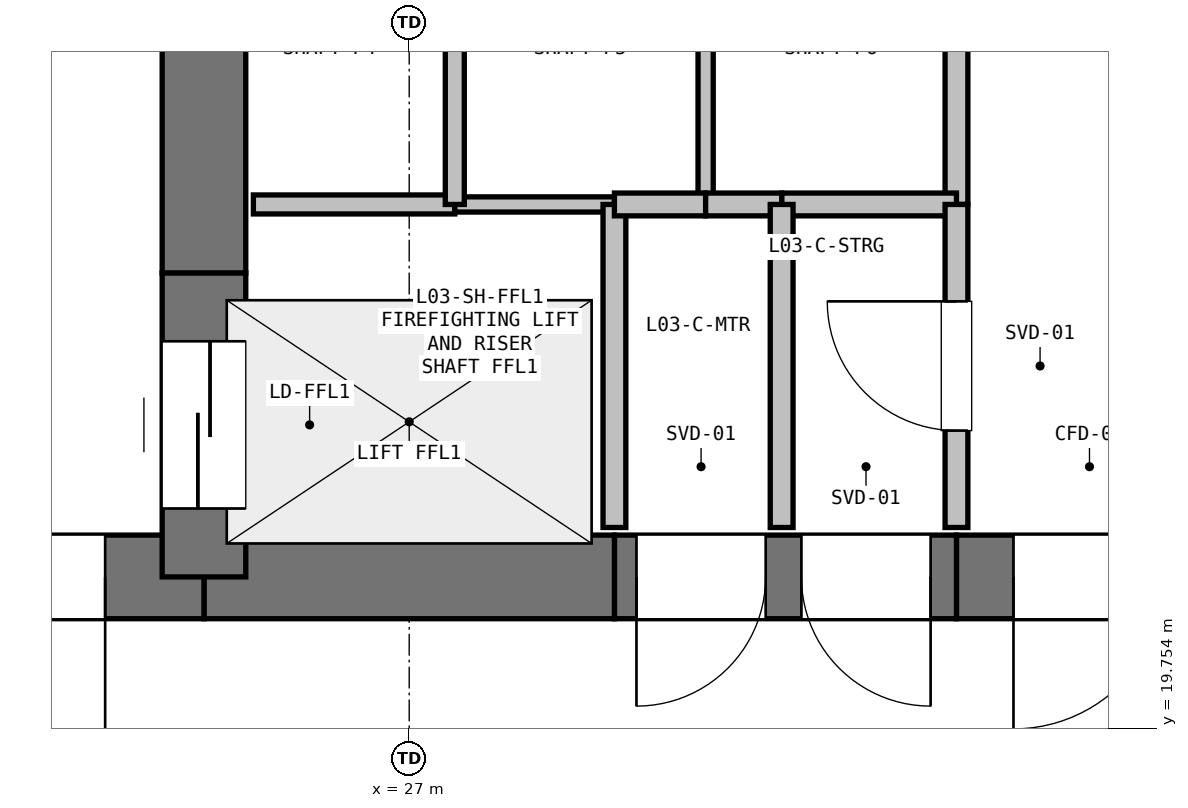
"""IFC4 building model, lengths in metres.
Left out: names, types, materials, properties, quantities, classifications, styles, units other than length and angle.
Written with IfcOpenShell. Run it as: python <this file> out.ifc"""

import sys

from ifc_helpers import new_model, si_unit, direction, frame, frame_2d, origin, place, context, subcontext, project, spatial, rectangle, extrude, element, fill, save


model = new_model("IFC4")
c1 = context("Model", 3, precision=1e-05, world=origin(), true_north=direction((0.0, 1.0)))
c2 = subcontext(c1, "Body", "Model", "MODEL_VIEW")
j1 = project(units=[si_unit("LENGTHUNIT", "METRE"), si_unit("PLANEANGLEUNIT", "RADIAN")], contexts=[c1])
p1 = place(None, origin())
s1 = spatial("IfcSite", under=j1, at=p1, CompositionType="ELEMENT")
p2 = place(p1, origin())
s2 = spatial("IfcBuilding", under=s1, at=p2, CompositionType="ELEMENT")
p3 = place(p2, frame((0.0, 0.0, 14.4)))
s3 = spatial("IfcBuildingStorey", under=s2, at=p3, CompositionType="ELEMENT", Elevation=14.4)
p4 = place(p3, frame((32.35, 20.75, 0.0), z_axis=(0.0, 0.0, 1.0), x_axis=(-1.0, 0.0, 0.0)))
e1 = element("IfcWall", 1, at=p4, inside=s3, PredefinedType="SHEAR", context=c2, shape_type="SweptSolid", body=[
    extrude(rectangle(XDim=1.75, YDim=0.55, at=frame_2d((0.875, 0.0))), origin(), (0.0, 0.0, 1.0), 4.52),
])
p5 = place(p4, frame((0.375, 0.0, 0.0)))
e2 = element("IfcOpeningElement", 2, at=p5, cuts=e1, PredefinedType="OPENING", context=c2, shape_type="SweptSolid", body=[
    extrude(rectangle(XDim=1.0, YDim=2.15, at=frame_2d((0.5, 1.075))), frame((0.0, 0.285, 0.0), z_axis=(0.0, -1.0, 0.0), x_axis=(1.0, 0.0, 0.0)), (0.0, 0.0, 1.0), 0.57),
])
p6 = place(p3, frame((30.6, 20.75, 0.0), z_axis=(0.0, 0.0, 1.0), x_axis=(-1.0, 0.0, 0.0)))
e3 = element("IfcWall", 3, at=p6, inside=s3, PredefinedType="SHEAR", context=c2, shape_type="SweptSolid", body=[
    extrude(rectangle(XDim=2.25, YDim=0.55, at=frame_2d((1.125, 0.0))), origin(), (0.0, 0.0, 1.0), 4.52),
])
p7 = place(p6, frame((1.255, 0.0, 0.0)))
e4 = element("IfcOpeningElement", 4, at=p7, cuts=e3, PredefinedType="OPENING", context=c2, shape_type="SweptSolid", body=[
    extrude(rectangle(XDim=0.85, YDim=2.1, at=frame_2d((0.425, 1.05))), frame((0.0, 0.285, 0.0), z_axis=(0.0, -1.0, 0.0), x_axis=(1.0, 0.0, 0.0)), (0.0, 0.0, 1.0), 0.57),
])
p8 = place(p6, frame((0.17, 0.0, 0.0)))
e5 = element("IfcOpeningElement", 5, at=p8, cuts=e3, PredefinedType="OPENING", context=c2, shape_type="SweptSolid", body=[
    extrude(rectangle(XDim=0.85, YDim=2.1, at=frame_2d((0.425, 1.05))), frame((0.0, 0.285, 0.0), z_axis=(0.0, -1.0, 0.0), x_axis=(1.0, 0.0, 0.0)), (0.0, 0.0, 1.0), 0.57),
])
p9 = place(p3, frame((28.35, 20.75, 0.0), z_axis=(0.0, 0.0, 1.0), x_axis=(-1.0, 0.0, 0.0)))
e6 = element("IfcWall", 6, at=p9, inside=s3, PredefinedType="SHEAR", context=c2, shape_type="SweptSolid", body=[
    extrude(rectangle(XDim=2.7, YDim=0.55, at=frame_2d((1.35, 0.0))), origin(), (0.0, 0.0, 1.0), 4.52),
])
p10 = place(p3, frame((25.65, 20.75, 0.0), z_axis=(0.0, 0.0, 1.0), x_axis=(-1.0, 0.0, 0.0)))
e7 = element("IfcWall", 7, at=p10, inside=s3, PredefinedType="SHEAR", context=c2, shape_type="SweptSolid", body=[
    extrude(rectangle(XDim=3.45, YDim=0.55, at=frame_2d((1.725, 0.0))), origin(), (0.0, 0.0, 1.0), 4.52),
])
p11 = place(p10, frame((0.65, 0.0, 0.0)))
e8 = element("IfcOpeningElement", 8, at=p11, cuts=e7, PredefinedType="OPENING", context=c2, shape_type="SweptSolid", body=[
    extrude(rectangle(XDim=1.15, YDim=2.15, at=frame_2d((0.575, 1.075))), frame((0.0, 0.285, 0.0), z_axis=(0.0, -1.0, 0.0), x_axis=(1.0, 0.0, 0.0)), (0.0, 0.0, 1.0), 0.57),
])
p12 = place(p3, frame((25.65, 20.75, 0.0), z_axis=(0.0, 0.0, 1.0), x_axis=(0.0, 1.0, 0.0)))
e9 = element("IfcWall", 9, at=p12, inside=s3, PredefinedType="SHEAR", context=c2, shape_type="SweptSolid", body=[
    extrude(rectangle(XDim=2.0, YDim=0.55, at=frame_2d((1.0, 0.0))), origin(), (0.0, 0.0, 1.0), 4.52),
])
p13 = place(p12, frame((0.45, 0.0, 0.0)))
e10 = element("IfcOpeningElement", 10, at=p13, cuts=e9, PredefinedType="OPENING", context=c2, shape_type="SweptSolid", body=[
    extrude(rectangle(XDim=1.1, YDim=2.15, at=frame_2d((0.55, 1.075))), frame((0.0, 0.285, 0.0), z_axis=(0.0, -1.0, 0.0), x_axis=(1.0, 0.0, 0.0)), (0.0, 0.0, 1.0), 0.57),
])
p14 = place(p3, frame((25.65, 22.75, 0.0), z_axis=(0.0, 0.0, 1.0), x_axis=(0.0, 1.0, 0.0)))
e11 = element("IfcWall", 11, at=p14, inside=s3, PredefinedType="SHEAR", context=c2, shape_type="SweptSolid", body=[
    extrude(rectangle(XDim=2.8, YDim=0.55, at=frame_2d((1.4, 0.0))), origin(), (0.0, 0.0, 1.0), 4.52),
])
p15 = place(p3, frame((25.975, 23.2, 0.0), z_axis=(0.0, 0.0, 1.0), x_axis=(1.0, 0.0, 0.0)))
e12 = element("IfcWall", 12, at=p15, inside=s3, PredefinedType="PARTITIONING", context=c2, shape_type="SweptSolid", body=[
    extrude(rectangle(XDim=1.325, YDim=0.125, at=frame_2d((0.663, 0.0))), origin(), (0.0, 0.0, 1.0), 4.52),
])
p16 = place(p3, frame((27.3, 23.2, 0.0), z_axis=(0.0, 0.0, 1.0), x_axis=(1.0, 0.0, 0.0)))
e13 = element("IfcWall", 13, at=p16, inside=s3, PredefinedType="PARTITIONING", context=c2, shape_type="SweptSolid", body=[
    extrude(rectangle(XDim=1.05, YDim=0.1, at=frame_2d((0.525, 0.0))), origin(), (0.0, 0.0, 1.0), 4.52),
])
p17 = place(p3, frame((28.35, 23.2, 0.0), z_axis=(0.0, 0.0, 1.0), x_axis=(0.0, -1.0, 0.0)))
e14 = element("IfcWall", 14, at=p17, inside=s3, PredefinedType="PARTITIONING", context=c2, shape_type="SweptSolid", body=[
    extrude(rectangle(XDim=2.125, YDim=0.15, at=frame_2d((1.062, 0.0))), origin(), (0.0, 0.0, 1.0), 4.52),
])
p18 = place(p3, frame((27.3, 25.4, 0.0), z_axis=(0.0, 0.0, 1.0), x_axis=(0.0, -1.0, 0.0)))
e15 = element("IfcWall", 15, at=p18, inside=s3, PredefinedType="PARTITIONING", context=c2, shape_type="SweptSolid", body=[
    extrude(rectangle(XDim=2.2, YDim=0.125, at=frame_2d((1.1, 0.0))), origin(), (0.0, 0.0, 1.0), 4.52),
])
p19 = place(p3, frame((28.95, 25.4, 0.0), z_axis=(0.0, 0.0, 1.0), x_axis=(0.0, -1.0, 0.0)))
e16 = element("IfcWall", 16, at=p19, inside=s3, PredefinedType="PARTITIONING", context=c2, shape_type="SweptSolid", body=[
    extrude(rectangle(XDim=2.2, YDim=0.1, at=frame_2d((1.1, 0.0))), origin(), (0.0, 0.0, 1.0), 4.52),
])
p20 = place(p3, frame((28.95, 23.2, 0.0), z_axis=(0.0, 0.0, 1.0), x_axis=(-1.0, 0.0, 0.0)))
e17 = element("IfcWall", 17, at=p20, inside=s3, PredefinedType="PARTITIONING", context=c2, shape_type="SweptSolid", body=[
    extrude(rectangle(XDim=0.6, YDim=0.15, at=frame_2d((0.3, 0.0))), origin(), (0.0, 0.0, 1.0), 4.52),
])
p21 = place(p3, frame((30.6, 25.4, 0.0), z_axis=(0.0, 0.0, 1.0), x_axis=(0.0, -1.0, 0.0)))
e18 = element("IfcWall", 18, at=p21, inside=s3, PredefinedType="PARTITIONING", context=c2, shape_type="SweptSolid", body=[
    extrude(rectangle(XDim=2.2, YDim=0.15, at=frame_2d((1.1, 0.0))), origin(), (0.0, 0.0, 1.0), 4.52),
])
p22 = place(p3, frame((30.6, 23.2, 0.0), z_axis=(0.0, 0.0, 1.0), x_axis=(-1.0, 0.0, 0.0)))
e19 = element("IfcWall", 19, at=p22, inside=s3, PredefinedType="PARTITIONING", context=c2, shape_type="SweptSolid", body=[
    extrude(rectangle(XDim=1.15, YDim=0.15, at=frame_2d((0.575, 0.0))), origin(), (0.0, 0.0, 1.0), 4.52),
])
p23 = place(p3, frame((29.45, 23.2, 0.0), z_axis=(0.0, 0.0, 1.0), x_axis=(-1.0, 0.0, 0.0)))
e20 = element("IfcWall", 20, at=p23, inside=s3, PredefinedType="PARTITIONING", context=c2, shape_type="SweptSolid", body=[
    extrude(rectangle(XDim=0.5, YDim=0.15, at=frame_2d((0.25, 0.0))), origin(), (0.0, 0.0, 1.0), 4.52),
])
p24 = place(p3, frame((30.6, 21.075, 0.0), z_axis=(0.0, 0.0, 1.0), x_axis=(0.0, 1.0, 0.0)))
e21 = element("IfcWall", 21, at=p24, inside=s3, PredefinedType="PARTITIONING", context=c2, shape_type="SweptSolid", body=[
    extrude(rectangle(XDim=2.125, YDim=0.15, at=frame_2d((1.062, 0.0))), origin(), (0.0, 0.0, 1.0), 4.52),
])
p25 = place(p24, frame((0.637, 0.0, 0.0)))
e22 = element("IfcOpeningElement", 22, at=p25, cuts=e21, PredefinedType="OPENING", context=c2, shape_type="SweptSolid", body=[
    extrude(rectangle(XDim=0.85, YDim=2.1, at=frame_2d((0.425, 1.05))), frame((0.0, 0.085, 0.0), z_axis=(0.0, -1.0, 0.0), x_axis=(1.0, 0.0, 0.0)), (0.0, 0.0, 1.0), 0.17),
])
p26 = place(p3, frame((29.45, 23.2, 0.0), z_axis=(0.0, 0.0, 1.0), x_axis=(0.0, -1.0, 0.0)))
e23 = element("IfcWall", 23, at=p26, inside=s3, PredefinedType="PARTITIONING", context=c2, shape_type="SweptSolid", body=[
    extrude(rectangle(XDim=2.125, YDim=0.15, at=frame_2d((1.062, 0.0))), origin(), (0.0, 0.0, 1.0), 4.52),
])
p27 = place(p5, origin())
e24 = element("IfcDoor", 24, at=p27, inside=s3, OperationType="SINGLE_SWING_RIGHT", PredefinedType="DOOR", context=c2, shape_type="SweptSolid", body=[
    extrude(rectangle(XDim=1.0, YDim=2.15, at=frame_2d((0.5, 1.075))), frame((0.0, 0.025, 0.0), z_axis=(0.0, -1.0, 0.0), x_axis=(1.0, 0.0, 0.0)), (0.0, 0.0, 1.0), 0.05),
])
fill(e2, e24)
p28 = place(p13, origin())
e25 = element("IfcDoor", 25, at=p28, inside=s3, OperationType="SLIDING_TO_LEFT", PredefinedType="DOOR", context=c2, shape_type="SweptSolid", body=[
    extrude(rectangle(XDim=1.1, YDim=2.15, at=frame_2d((0.55, 1.075))), frame((0.0, 0.025, 0.0), z_axis=(0.0, -1.0, 0.0), x_axis=(1.0, 0.0, 0.0)), (0.0, 0.0, 1.0), 0.05),
])
fill(e10, e25)
p29 = place(p11, origin())
e26 = element("IfcDoor", 26, at=p29, inside=s3, OperationType="SINGLE_SWING_LEFT", PredefinedType="DOOR", context=c2, shape_type="SweptSolid", body=[
    extrude(rectangle(XDim=1.15, YDim=2.15, at=frame_2d((0.575, 1.075))), frame((0.0, 0.025, 0.0), z_axis=(0.0, -1.0, 0.0), x_axis=(1.0, 0.0, 0.0)), (0.0, 0.0, 1.0), 0.05),
])
fill(e8, e26)
p30 = place(p25, origin())
e27 = element("IfcDoor", 27, at=p30, inside=s3, OperationType="SINGLE_SWING_RIGHT", PredefinedType="DOOR", context=c2, shape_type="SweptSolid", body=[
    extrude(rectangle(XDim=0.85, YDim=2.1, at=frame_2d((0.425, 1.05))), frame((0.0, 0.025, 0.0), z_axis=(0.0, -1.0, 0.0), x_axis=(1.0, 0.0, 0.0)), (0.0, 0.0, 1.0), 0.05),
])
fill(e22, e27)
p31 = place(p7, origin())
e28 = element("IfcDoor", 28, at=p31, inside=s3, OperationType="SINGLE_SWING_RIGHT", PredefinedType="DOOR", context=c2, shape_type="SweptSolid", body=[
    extrude(rectangle(XDim=0.85, YDim=2.1, at=frame_2d((0.425, 1.05))), frame((0.0, 0.025, 0.0), z_axis=(0.0, -1.0, 0.0), x_axis=(1.0, 0.0, 0.0)), (0.0, 0.0, 1.0), 0.05),
])
fill(e4, e28)
p32 = place(p8, origin())
e29 = element("IfcDoor", 29, at=p32, inside=s3, OperationType="SINGLE_SWING_LEFT", PredefinedType="DOOR", context=c2, shape_type="SweptSolid", body=[
    extrude(rectangle(XDim=0.85, YDim=2.1, at=frame_2d((0.425, 1.05))), frame((0.0, 0.025, 0.0), z_axis=(0.0, -1.0, 0.0), x_axis=(1.0, 0.0, 0.0)), (0.0, 0.0, 1.0), 0.05),
])
fill(e5, e29)
save(model, sys.argv[1])
